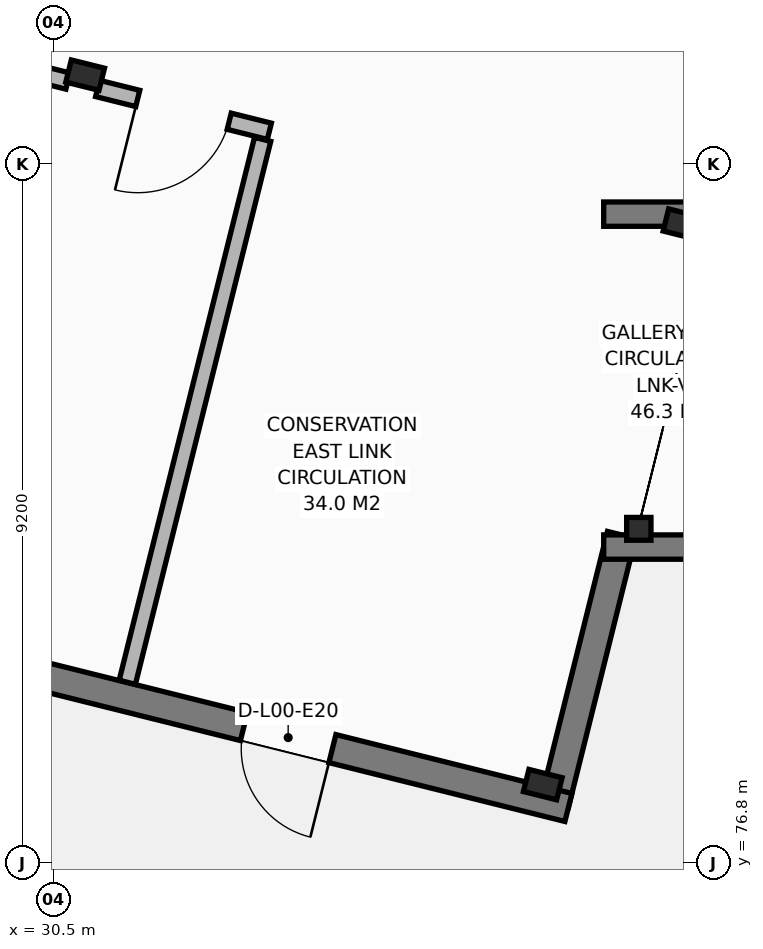
"""IFC4 building model, lengths in metres.
Left out: names, types, materials, properties, quantities, classifications, styles, units other than length and angle.
Written with IfcOpenShell. Run it as: python <this file> out.ifc"""

import sys

from ifc_helpers import new_model, si_unit, direction, frame, frame_2d, origin, origin_2d, place, context, subcontext, project, spatial, rectangle, i_section, extrude, element, fill, save


model = new_model("IFC4")
c1 = context("Model", 3, precision=1e-05, world=origin(), true_north=direction((0.0, 1.0)))
c2 = subcontext(c1, "Body", "Model", "MODEL_VIEW")
j1 = project(units=[si_unit("LENGTHUNIT", "METRE"), si_unit("PLANEANGLEUNIT", "RADIAN")], contexts=[c1])
p1 = place(None, origin())
s1 = spatial("IfcSite", under=j1, at=p1, CompositionType="ELEMENT")
p2 = place(p1, origin())
s2 = spatial("IfcBuilding", under=s1, at=p2, CompositionType="ELEMENT")
p3 = place(p2, origin())
s3 = spatial("IfcBuildingStorey", under=s2, at=p3, CompositionType="ELEMENT", Elevation=0.0)
for number, where, z_axis, x_axis in (
    (1, (30.916, 87.169, 0.0), (0.0, 0.0, 1.0), (0.97, -0.242, 0.0)),
    (2, (36.936, 77.835, 0.0), (0.0, 0.0, 1.0), (0.97, -0.242, 0.0)),
    (3, (38.775, 85.209, 0.0), (0.0, 0.0, 1.0), (0.97, -0.242, 0.0)),
):
    element("IfcColumn", number, at=place(p3, frame(where, z_axis=z_axis, x_axis=x_axis)), inside=s3, PredefinedType="COLUMN", context=c2, shape_type="SweptSolid", body=[
        extrude(i_section(OverallWidth=0.3, OverallDepth=0.45, WebThickness=0.014, FlangeThickness=0.026, FilletRadius=0.027, at=origin_2d()), origin(), (0.0, 0.0, 1.0), 5.1),
    ])
p4 = place(p3, frame((38.2, 81.2, 0.0), z_axis=(0.0, 0.0, 1.0), x_axis=(1.0, 0.0, 0.0)))
e4 = element("IfcColumn", 4, at=p4, inside=s3, PredefinedType="COLUMN", context=c2, shape_type="SweptSolid", body=[
    extrude(i_section(OverallWidth=0.3, OverallDepth=0.32, WebThickness=0.011, FlangeThickness=0.021, FilletRadius=0.027, at=origin_2d()), origin(), (0.0, 0.0, 1.0), 5.1),
])
p5 = place(p3, frame((37.972, 81.12, 0.0), z_axis=(0.0, 0.0, 1.0), x_axis=(-0.241905764761, -0.970299748003, 0.0)))
e5 = element("IfcWall", 5, at=p5, inside=s3, PredefinedType="SOLIDWALL", context=c2, shape_type="SweptSolid", body=[
    extrude(rectangle(XDim=3.648, YDim=0.38, at=frame_2d((1.824, 0.0))), origin(), (0.0, 0.0, 1.0), 4.88),
])
p6 = place(p3, frame((37.274, 77.534, 0.0), z_axis=(0.0, 0.0, 1.0), x_axis=(-0.970295504299, 0.2419227859, 0.0)))
e6 = element("IfcWall", 6, at=p6, inside=s3, PredefinedType="SOLIDWALL", context=c2, shape_type="SweptSolid", body=[
    extrude(rectangle(XDim=32.81, YDim=0.38, at=frame_2d((16.405, 0.0))), origin(), (0.0, 0.0, 1.0), 4.88),
])
p7 = place(p6, frame((3.2, 0.0, 0.0)))
e7 = element("IfcOpeningElement", 7, at=p7, cuts=e6, PredefinedType="OPENING", context=c2, shape_type="SweptSolid", body=[
    extrude(rectangle(XDim=1.2, YDim=2.15, at=frame_2d((0.6, 1.075))), frame((0.0, 0.2, 0.0), z_axis=(0.0, -1.0, 0.0), x_axis=(1.0, 0.0, 0.0)), (0.0, 0.0, 1.0), 0.4),
])
p8 = place(p6, frame((10.7, 0.0, 0.0)))
e8 = element("IfcOpeningElement", 8, at=p8, cuts=e6, PredefinedType="OPENING", context=c2, shape_type="SweptSolid", body=[
    extrude(rectangle(XDim=3.1, YDim=3.1, at=frame_2d((1.55, 1.55))), frame((0.0, 0.2, 0.0), z_axis=(0.0, -1.0, 0.0), x_axis=(1.0, 0.0, 0.0)), (0.0, 0.0, 1.0), 0.4),
])
p9 = place(p6, frame((19.5, 0.0, 0.0)))
e9 = element("IfcOpeningElement", 9, at=p9, cuts=e6, PredefinedType="OPENING", context=c2, shape_type="SweptSolid", body=[
    extrude(rectangle(XDim=3.1, YDim=3.1, at=frame_2d((1.55, 1.55))), frame((0.0, 0.2, 0.0), z_axis=(0.0, -1.0, 0.0), x_axis=(1.0, 0.0, 0.0)), (0.0, 0.0, 1.0), 0.4),
])
p10 = place(p6, frame((26.01, 0.0, 0.0)))
e10 = element("IfcOpeningElement", 10, at=p10, cuts=e6, PredefinedType="OPENING", context=c2, shape_type="SweptSolid", body=[
    extrude(rectangle(XDim=3.8, YDim=3.5, at=frame_2d((1.9, 1.75))), frame((0.0, 0.2, 0.0), z_axis=(0.0, -1.0, 0.0), x_axis=(1.0, 0.0, 0.0)), (0.0, 0.0, 1.0), 0.4),
])
p11 = place(p3, frame((49.05, 80.96, 0.0), z_axis=(0.0, 0.0, 1.0), x_axis=(-1.0, 0.0, 0.0)))
e11 = element("IfcWall", 11, at=p11, inside=s3, PredefinedType="SOLIDWALL", context=c2, shape_type="SweptSolid", body=[
    extrude(rectangle(XDim=11.312, YDim=0.32, at=frame_2d((5.656, 0.0))), origin(), (0.0, 0.0, 1.0), 4.82),
])
p12 = place(p11, frame((4.681, 0.0, 1.12)))
e12 = element("IfcOpeningElement", 12, at=p12, cuts=e11, PredefinedType="OPENING", context=c2, shape_type="SweptSolid", body=[
    extrude(rectangle(XDim=1.95, YDim=1.5, at=frame_2d((0.975, 0.75))), frame((0.0, 0.17, 0.0), z_axis=(0.0, -1.0, 0.0), x_axis=(1.0, 0.0, 0.0)), (0.0, 0.0, 1.0), 0.34),
])
p13 = place(p3, frame((37.738, 85.34, 0.0), z_axis=(0.0, 0.0, 1.0), x_axis=(1.0, 0.0, 0.0)))
e13 = element("IfcWall", 13, at=p13, inside=s3, PredefinedType="SOLIDWALL", context=c2, shape_type="SweptSolid", body=[
    extrude(rectangle(XDim=11.312, YDim=0.32, at=frame_2d((5.656, 0.0))), origin(), (0.0, 0.0, 1.0), 4.82),
])
p14 = place(p13, frame((4.681, 0.0, 1.12)))
e14 = element("IfcOpeningElement", 14, at=p14, cuts=e13, PredefinedType="OPENING", context=c2, shape_type="SweptSolid", body=[
    extrude(rectangle(XDim=1.95, YDim=1.5, at=frame_2d((0.975, 0.75))), frame((0.0, 0.17, 0.0), z_axis=(0.0, -1.0, 0.0), x_axis=(1.0, 0.0, 0.0)), (0.0, 0.0, 1.0), 0.34),
])
p15 = place(p3, frame((30.689, 87.091, 0.0), z_axis=(0.0, 0.0, 1.0), x_axis=(-0.970295427473, 0.241923094029, 0.0)))
e15 = element("IfcWall", 15, at=p15, inside=s3, PredefinedType="PARTITIONING", context=c2, shape_type="SweptSolid", body=[
    extrude(rectangle(XDim=7.597, YDim=0.22, at=frame_2d((3.798, 0.0))), origin(), (0.0, 0.0, 1.0), 4.37),
])
p16 = place(p3, frame((33.339, 86.43, 0.0), z_axis=(0.0, 0.0, 1.0), x_axis=(-0.970308784597, 0.241869515512, 0.0)))
e16 = element("IfcWall", 16, at=p16, inside=s3, PredefinedType="PARTITIONING", context=c2, shape_type="SweptSolid", body=[
    extrude(rectangle(XDim=2.329, YDim=0.22, at=frame_2d((1.164, 0.0))), origin(), (0.0, 0.0, 1.0), 4.37),
])
p17 = place(p16, frame((0.544, 0.0, 0.0)))
e17 = element("IfcOpeningElement", 17, at=p17, cuts=e16, PredefinedType="OPENING", context=c2, shape_type="SweptSolid", body=[
    extrude(rectangle(XDim=1.24, YDim=2.15, at=frame_2d((0.62, 1.075))), frame((0.0, 0.12, 0.0), z_axis=(0.0, -1.0, 0.0), x_axis=(1.0, 0.0, 0.0)), (0.0, 0.0, 1.0), 0.24),
])
p18 = place(p3, frame((31.47, 79.181, 0.0), z_axis=(0.0, 0.0, 1.0), x_axis=(0.241919062701, 0.970296432592, 0.0)))
e18 = element("IfcWall", 18, at=p18, inside=s3, PredefinedType="PARTITIONING", context=c2, shape_type="SweptSolid", body=[
    extrude(rectangle(XDim=7.361, YDim=0.22, at=frame_2d((3.681, 0.0))), origin(), (0.0, 0.0, 1.0), 4.37),
])
p19 = place(p7, origin())
e19 = element("IfcDoor", 19, at=p19, inside=s3, OperationType="SINGLE_SWING_LEFT", PredefinedType="DOOR", context=c2, shape_type="SweptSolid", body=[
    extrude(rectangle(XDim=1.2, YDim=2.15, at=frame_2d((0.6, 1.075))), frame((0.0, 0.025, 0.0), z_axis=(0.0, -1.0, 0.0), x_axis=(1.0, 0.0, 0.0)), (0.0, 0.0, 1.0), 0.05),
])
fill(e7, e19)
p20 = place(p17, origin())
e20 = element("IfcDoor", 20, at=p20, inside=s3, OperationType="SINGLE_SWING_RIGHT", PredefinedType="DOOR", context=c2, shape_type="SweptSolid", body=[
    extrude(rectangle(XDim=1.24, YDim=2.15, at=frame_2d((0.62, 1.075))), frame((0.0, 0.025, 0.0), z_axis=(0.0, -1.0, 0.0), x_axis=(1.0, 0.0, 0.0)), (0.0, 0.0, 1.0), 0.05),
])
fill(e17, e20)
save(model, sys.argv[1])
